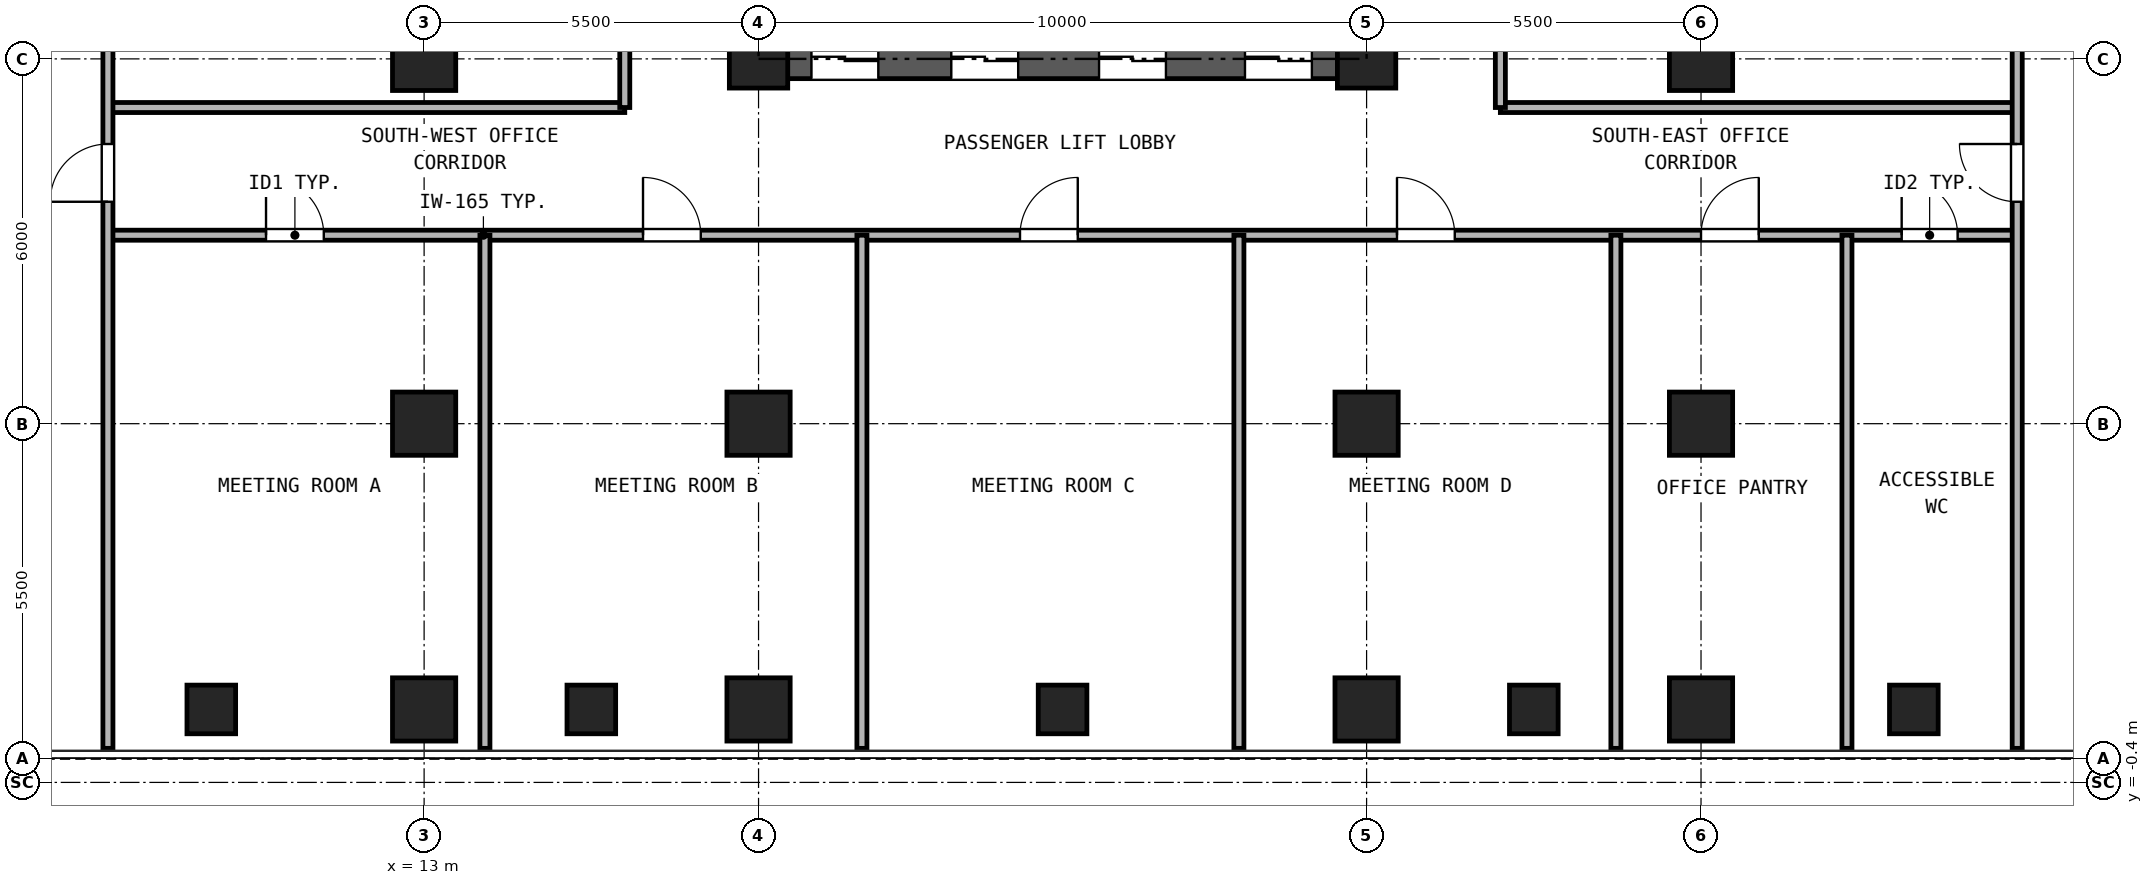
"""IFC4 building model, lengths in metres.
Left out: names, types, materials, properties, quantities, classifications, styles, units other than length and angle.
Written with IfcOpenShell. Run it as: python <this file> out.ifc"""

import sys

from ifc_helpers import new_model, si_unit, direction, frame, frame_2d, origin, origin_2d, place, context, subcontext, project, spatial, rectangle, hollow_rectangle, extrude, source, transform, mapped, element, fill, save


model = new_model("IFC4")
c1 = context("Model", 3, precision=1e-05, world=origin(), true_north=direction((0.0, 1.0)))
c2 = subcontext(c1, "Body", "Model", "MODEL_VIEW")
j1 = project(units=[si_unit("LENGTHUNIT", "METRE"), si_unit("PLANEANGLEUNIT", "RADIAN")], contexts=[c1])
p1 = place(None, origin())
s1 = spatial("IfcSite", under=j1, at=p1, CompositionType="ELEMENT")
p2 = place(p1, origin())
s2 = spatial("IfcBuilding", under=s1, at=p2, CompositionType="ELEMENT")
p3 = place(p2, frame((0.0, 0.0, 65.7)))
s3 = spatial("IfcBuildingStorey", under=s2, at=p3, CompositionType="ELEMENT", Elevation=65.7)
m1 = source(origin(), c2, "Body", "SweptSolid", [
    extrude(hollow_rectangle(XDim=1.04, YDim=1.04, WallThickness=0.065, at=origin_2d()), origin(), (0.0, 0.0, 1.0), 3.32),
])
for number, where, z_axis, x_axis in (
    (1, (13.0, 0.8, 0.0), (0.0, 0.0, 1.0), (1.0, 0.0, 0.0)),
    (2, (18.5, 0.8, 0.0), (0.0, 0.0, 1.0), (1.0, 0.0, 0.0)),
    (3, (28.5, 0.8, 0.0), (0.0, 0.0, 1.0), (1.0, 0.0, 0.0)),
    (4, (34.0, 0.8, 0.0), (0.0, 0.0, 1.0), (1.0, 0.0, 0.0)),
    (5, (13.0, 5.5, 0.0), (0.0, 0.0, 1.0), (1.0, 0.0, 0.0)),
    (6, (13.0, 11.5, 0.0), (0.0, 0.0, 1.0), (1.0, 0.0, 0.0)),
    (7, (18.5, 5.5, 0.0), (0.0, 0.0, 1.0), (1.0, 0.0, 0.0)),
):
    element("IfcColumn", number, at=place(p3, frame(where, z_axis=z_axis, x_axis=x_axis)), inside=s3, PredefinedType="COLUMN", context=c2, shape_type="MappedRepresentation", body=[
        mapped(m1, transform((0.0, 0.0, 0.0), x_axis=(1.0, 0.0, 0.0), y_axis=(0.0, 1.0, 0.0), z_axis=(0.0, 0.0, 1.0), scale=1.0)),
    ])
m2 = source(origin(), c2, "Body", "SweptSolid", [
    extrude(hollow_rectangle(XDim=0.96, YDim=0.96, WallThickness=0.06, at=origin_2d()), origin(), (0.0, 0.0, 1.0), 3.32),
])
p4 = place(p3, frame((18.5, 11.5, 0.0), z_axis=(0.0, 0.0, 1.0), x_axis=(1.0, 0.0, 0.0)))
e8 = element("IfcColumn", 8, at=p4, inside=s3, PredefinedType="COLUMN", context=c2, shape_type="MappedRepresentation", body=[
    mapped(m2, transform((0.0, 0.0, 0.0), x_axis=(1.0, 0.0, 0.0), y_axis=(0.0, 1.0, 0.0), z_axis=(0.0, 0.0, 1.0), scale=1.0)),
])
p5 = place(p3, frame((28.5, 5.5, 0.0), z_axis=(0.0, 0.0, 1.0), x_axis=(1.0, 0.0, 0.0)))
e9 = element("IfcColumn", 9, at=p5, inside=s3, PredefinedType="COLUMN", context=c2, shape_type="MappedRepresentation", body=[
    mapped(m1, transform((0.0, 0.0, 0.0), x_axis=(1.0, 0.0, 0.0), y_axis=(0.0, 1.0, 0.0), z_axis=(0.0, 0.0, 1.0), scale=1.0)),
])
p6 = place(p3, frame((28.5, 11.5, 0.0), z_axis=(0.0, 0.0, 1.0), x_axis=(1.0, 0.0, 0.0)))
e10 = element("IfcColumn", 10, at=p6, inside=s3, PredefinedType="COLUMN", context=c2, shape_type="MappedRepresentation", body=[
    mapped(m2, transform((0.0, 0.0, 0.0), x_axis=(1.0, 0.0, 0.0), y_axis=(0.0, 1.0, 0.0), z_axis=(0.0, 0.0, 1.0), scale=1.0)),
])
for number, where, z_axis, x_axis in (
    (11, (34.0, 5.5, 0.0), (0.0, 0.0, 1.0), (1.0, 0.0, 0.0)),
    (12, (34.0, 11.5, 0.0), (0.0, 0.0, 1.0), (1.0, 0.0, 0.0)),
):
    element("IfcColumn", number, at=place(p3, frame(where, z_axis=z_axis, x_axis=x_axis)), inside=s3, PredefinedType="COLUMN", context=c2, shape_type="MappedRepresentation", body=[
        mapped(m1, transform((0.0, 0.0, 0.0), x_axis=(1.0, 0.0, 0.0), y_axis=(0.0, 1.0, 0.0), z_axis=(0.0, 0.0, 1.0), scale=1.0)),
    ])
m3 = source(origin(), c2, "Body", "SweptSolid", [
    extrude(hollow_rectangle(XDim=0.8, YDim=0.8, WallThickness=0.045, at=origin_2d()), origin(), (0.0, 0.0, 1.0), 3.32),
])
for number, where, z_axis, x_axis in (
    (13, (9.5, 0.8, 0.0), (0.0, 0.0, 1.0), (1.0, 0.0, 0.0)),
    (14, (15.75, 0.8, 0.0), (0.0, 0.0, 1.0), (1.0, 0.0, 0.0)),
    (15, (23.5, 0.8, 0.0), (0.0, 0.0, 1.0), (1.0, 0.0, 0.0)),
    (16, (31.25, 0.8, 0.0), (0.0, 0.0, 1.0), (1.0, 0.0, 0.0)),
    (17, (37.5, 0.8, 0.0), (0.0, 0.0, 1.0), (1.0, 0.0, 0.0)),
):
    element("IfcColumn", number, at=place(p3, frame(where, z_axis=z_axis, x_axis=x_axis)), inside=s3, PredefinedType="COLUMN", context=c2, shape_type="MappedRepresentation", body=[
        mapped(m3, transform((0.0, 0.0, 0.0), x_axis=(1.0, 0.0, 0.0), y_axis=(0.0, 1.0, 0.0), z_axis=(0.0, 0.0, 1.0), scale=1.0)),
    ])
p7 = place(p3, frame((18.175, 11.5, 0.0), z_axis=(0.0, 0.0, 1.0), x_axis=(1.0, 0.0, 0.0)))
e18 = element("IfcWall", 18, at=p7, inside=s3, PredefinedType="SHEAR", context=c2, shape_type="SweptSolid", body=[
    extrude(rectangle(XDim=10.65, YDim=0.65, at=frame_2d((5.325, 0.0))), origin(), (0.0, 0.0, 1.0), 3.32),
])
p8 = place(p7, frame((1.195, 0.0, 0.0)))
e19 = element("IfcOpeningElement", 19, at=p8, cuts=e18, PredefinedType="OPENING", context=c2, shape_type="SweptSolid", body=[
    extrude(rectangle(XDim=1.1, YDim=2.25, at=frame_2d((0.55, 1.125))), frame((0.0, 0.335, 0.0), z_axis=(0.0, -1.0, 0.0), x_axis=(1.0, 0.0, 0.0)), (0.0, 0.0, 1.0), 0.67),
])
p9 = place(p7, frame((3.495, 0.0, 0.0)))
e20 = element("IfcOpeningElement", 20, at=p9, cuts=e18, PredefinedType="OPENING", context=c2, shape_type="SweptSolid", body=[
    extrude(rectangle(XDim=1.1, YDim=2.25, at=frame_2d((0.55, 1.125))), frame((0.0, 0.335, 0.0), z_axis=(0.0, -1.0, 0.0), x_axis=(1.0, 0.0, 0.0)), (0.0, 0.0, 1.0), 0.67),
])
p10 = place(p7, frame((5.925, 0.0, 0.0)))
e21 = element("IfcOpeningElement", 21, at=p10, cuts=e18, PredefinedType="OPENING", context=c2, shape_type="SweptSolid", body=[
    extrude(rectangle(XDim=1.1, YDim=2.25, at=frame_2d((0.55, 1.125))), frame((0.0, 0.335, 0.0), z_axis=(0.0, -1.0, 0.0), x_axis=(1.0, 0.0, 0.0)), (0.0, 0.0, 1.0), 0.67),
])
p11 = place(p7, frame((8.325, 0.0, 0.0)))
e22 = element("IfcOpeningElement", 22, at=p11, cuts=e18, PredefinedType="OPENING", context=c2, shape_type="SweptSolid", body=[
    extrude(rectangle(XDim=1.1, YDim=2.25, at=frame_2d((0.55, 1.125))), frame((0.0, 0.335, 0.0), z_axis=(0.0, -1.0, 0.0), x_axis=(1.0, 0.0, 0.0)), (0.0, 0.0, 1.0), 0.67),
])
p12 = place(p3, frame((7.8, 8.6, 0.0), z_axis=(0.0, 0.0, 1.0), x_axis=(1.0, 0.0, 0.0)))
e23 = element("IfcWall", 23, at=p12, inside=s3, PredefinedType="PARTITIONING", context=c2, shape_type="SweptSolid", body=[
    extrude(rectangle(XDim=31.4, YDim=0.165, at=frame_2d((15.7, 0.0))), origin(), (0.0, 0.0, 1.0), 2.898),
])
p13 = place(p12, frame((2.6, 0.0, 0.0)))
e24 = element("IfcOpeningElement", 24, at=p13, cuts=e23, PredefinedType="OPENING", context=c2, shape_type="SweptSolid", body=[
    extrude(rectangle(XDim=0.95, YDim=2.15, at=frame_2d((0.475, 1.075))), frame((0.0, 0.093, 0.0), z_axis=(0.0, -1.0, 0.0), x_axis=(1.0, 0.0, 0.0)), (0.0, 0.0, 1.0), 0.185),
])
p14 = place(p12, frame((8.8, 0.0, 0.0)))
e25 = element("IfcOpeningElement", 25, at=p14, cuts=e23, PredefinedType="OPENING", context=c2, shape_type="SweptSolid", body=[
    extrude(rectangle(XDim=0.95, YDim=2.15, at=frame_2d((0.475, 1.075))), frame((0.0, 0.093, 0.0), z_axis=(0.0, -1.0, 0.0), x_axis=(1.0, 0.0, 0.0)), (0.0, 0.0, 1.0), 0.185),
])
p15 = place(p12, frame((15.0, 0.0, 0.0)))
e26 = element("IfcOpeningElement", 26, at=p15, cuts=e23, PredefinedType="OPENING", context=c2, shape_type="SweptSolid", body=[
    extrude(rectangle(XDim=0.95, YDim=2.15, at=frame_2d((0.475, 1.075))), frame((0.0, 0.093, 0.0), z_axis=(0.0, -1.0, 0.0), x_axis=(1.0, 0.0, 0.0)), (0.0, 0.0, 1.0), 0.185),
])
p16 = place(p12, frame((21.2, 0.0, 0.0)))
e27 = element("IfcOpeningElement", 27, at=p16, cuts=e23, PredefinedType="OPENING", context=c2, shape_type="SweptSolid", body=[
    extrude(rectangle(XDim=0.95, YDim=2.15, at=frame_2d((0.475, 1.075))), frame((0.0, 0.093, 0.0), z_axis=(0.0, -1.0, 0.0), x_axis=(1.0, 0.0, 0.0)), (0.0, 0.0, 1.0), 0.185),
])
p17 = place(p12, frame((26.2, 0.0, 0.0)))
e28 = element("IfcOpeningElement", 28, at=p17, cuts=e23, PredefinedType="OPENING", context=c2, shape_type="SweptSolid", body=[
    extrude(rectangle(XDim=0.95, YDim=2.15, at=frame_2d((0.475, 1.075))), frame((0.0, 0.093, 0.0), z_axis=(0.0, -1.0, 0.0), x_axis=(1.0, 0.0, 0.0)), (0.0, 0.0, 1.0), 0.185),
])
p18 = place(p12, frame((29.5, 0.0, 0.0)))
e29 = element("IfcOpeningElement", 29, at=p18, cuts=e23, PredefinedType="OPENING", context=c2, shape_type="SweptSolid", body=[
    extrude(rectangle(XDim=0.92, YDim=2.1, at=frame_2d((0.46, 1.05))), frame((0.0, 0.093, 0.0), z_axis=(0.0, -1.0, 0.0), x_axis=(1.0, 0.0, 0.0)), (0.0, 0.0, 1.0), 0.185),
])
for number, where, z_axis, x_axis in (
    (30, (7.8, 10.7, 0.0), (0.0, 0.0, 1.0), (1.0, 0.0, 0.0)),
    (31, (30.7, 10.7, 0.0), (0.0, 0.0, 1.0), (1.0, 0.0, 0.0)),
):
    element("IfcWall", number, at=place(p3, frame(where, z_axis=z_axis, x_axis=x_axis)), inside=s3, PredefinedType="PARTITIONING", context=c2, shape_type="SweptSolid", body=[
        extrude(rectangle(XDim=8.5, YDim=0.165, at=frame_2d((4.25, 0.0))), origin(), (0.0, 0.0, 1.0), 3.32),
    ])
p19 = place(p3, frame((16.3, 10.7, 0.0), z_axis=(0.0, 0.0, 1.0), x_axis=(0.0, 1.0, 0.0)))
e32 = element("IfcWall", 32, at=p19, inside=s3, PredefinedType="PARTITIONING", context=c2, shape_type="SweptSolid", body=[
    extrude(rectangle(XDim=18.9, YDim=0.165, at=frame_2d((9.45, 0.0))), origin(), (0.0, 0.0, 1.0), 3.32),
])
p20 = place(p19, frame((5.611, 0.0, 0.0)))
e33 = element("IfcOpeningElement", 33, at=p20, cuts=e32, PredefinedType="OPENING", context=c2, shape_type="SweptSolid", body=[
    extrude(rectangle(XDim=0.95, YDim=2.15, at=frame_2d((0.475, 1.075))), frame((0.0, 0.093, 0.0), z_axis=(0.0, -1.0, 0.0), x_axis=(1.0, 0.0, 0.0)), (0.0, 0.0, 1.0), 0.185),
])
p21 = place(p19, frame((15.061, 0.0, 0.0)))
e34 = element("IfcOpeningElement", 34, at=p21, cuts=e32, PredefinedType="OPENING", context=c2, shape_type="SweptSolid", body=[
    extrude(rectangle(XDim=0.95, YDim=2.15, at=frame_2d((0.475, 1.075))), frame((0.0, 0.093, 0.0), z_axis=(0.0, -1.0, 0.0), x_axis=(1.0, 0.0, 0.0)), (0.0, 0.0, 1.0), 0.185),
])
p22 = place(p3, frame((30.7, 10.7, 0.0), z_axis=(0.0, 0.0, 1.0), x_axis=(0.0, 1.0, 0.0)))
e35 = element("IfcWall", 35, at=p22, inside=s3, PredefinedType="PARTITIONING", context=c2, shape_type="SweptSolid", body=[
    extrude(rectangle(XDim=18.9, YDim=0.165, at=frame_2d((9.45, 0.0))), origin(), (0.0, 0.0, 1.0), 3.32),
])
p23 = place(p22, frame((8.95, 0.0, 0.0)))
e36 = element("IfcOpeningElement", 36, at=p23, cuts=e35, PredefinedType="OPENING", context=c2, shape_type="SweptSolid", body=[
    extrude(rectangle(XDim=0.95, YDim=2.15, at=frame_2d((0.475, 1.075))), frame((0.0, 0.093, 0.0), z_axis=(0.0, -1.0, 0.0), x_axis=(1.0, 0.0, 0.0)), (0.0, 0.0, 1.0), 0.185),
])
p24 = place(p3, frame((7.8, 0.16, 0.0), z_axis=(0.0, 0.0, 1.0), x_axis=(0.0, 1.0, 0.0)))
e37 = element("IfcWall", 37, at=p24, inside=s3, PredefinedType="PARTITIONING", context=c2, shape_type="SweptSolid", body=[
    extrude(rectangle(XDim=40.18, YDim=0.165, at=frame_2d((20.09, 0.0))), origin(), (0.0, 0.0, 1.0), 3.32),
])
p25 = place(p24, frame((8.99, 0.0, 0.0)))
e38 = element("IfcOpeningElement", 38, at=p25, cuts=e37, PredefinedType="OPENING", context=c2, shape_type="SweptSolid", body=[
    extrude(rectangle(XDim=0.95, YDim=2.15, at=frame_2d((0.475, 1.075))), frame((0.0, 0.093, 0.0), z_axis=(0.0, -1.0, 0.0), x_axis=(1.0, 0.0, 0.0)), (0.0, 0.0, 1.0), 0.185),
])
p26 = place(p24, frame((29.99, 0.0, 0.0)))
e39 = element("IfcOpeningElement", 39, at=p26, cuts=e37, PredefinedType="OPENING", context=c2, shape_type="SweptSolid", body=[
    extrude(rectangle(XDim=0.95, YDim=2.15, at=frame_2d((0.475, 1.075))), frame((0.0, 0.093, 0.0), z_axis=(0.0, -1.0, 0.0), x_axis=(1.0, 0.0, 0.0)), (0.0, 0.0, 1.0), 0.185),
])
p27 = place(p3, frame((39.2, 0.16, 0.0), z_axis=(0.0, 0.0, 1.0), x_axis=(0.0, 1.0, 0.0)))
e40 = element("IfcWall", 40, at=p27, inside=s3, PredefinedType="PARTITIONING", context=c2, shape_type="SweptSolid", body=[
    extrude(rectangle(XDim=40.18, YDim=0.165, at=frame_2d((20.09, 0.0))), origin(), (0.0, 0.0, 1.0), 3.32),
])
p28 = place(p27, frame((8.99, 0.0, 0.0)))
e41 = element("IfcOpeningElement", 41, at=p28, cuts=e40, PredefinedType="OPENING", context=c2, shape_type="SweptSolid", body=[
    extrude(rectangle(XDim=0.95, YDim=2.15, at=frame_2d((0.475, 1.075))), frame((0.0, 0.093, 0.0), z_axis=(0.0, -1.0, 0.0), x_axis=(1.0, 0.0, 0.0)), (0.0, 0.0, 1.0), 0.185),
])
p29 = place(p27, frame((29.99, 0.0, 0.0)))
e42 = element("IfcOpeningElement", 42, at=p29, cuts=e40, PredefinedType="OPENING", context=c2, shape_type="SweptSolid", body=[
    extrude(rectangle(XDim=0.95, YDim=2.15, at=frame_2d((0.475, 1.075))), frame((0.0, 0.093, 0.0), z_axis=(0.0, -1.0, 0.0), x_axis=(1.0, 0.0, 0.0)), (0.0, 0.0, 1.0), 0.185),
])
for number, where, z_axis, x_axis in (
    (43, (14.0, 0.16, 0.0), (0.0, 0.0, 1.0), (0.0, 1.0, 0.0)),
    (44, (20.2, 0.16, 0.0), (0.0, 0.0, 1.0), (0.0, 1.0, 0.0)),
    (45, (26.4, 0.16, 0.0), (0.0, 0.0, 1.0), (0.0, 1.0, 0.0)),
    (46, (32.6, 0.16, 0.0), (0.0, 0.0, 1.0), (0.0, 1.0, 0.0)),
    (47, (36.4, 0.16, 0.0), (0.0, 0.0, 1.0), (0.0, 1.0, 0.0)),
):
    element("IfcWall", number, at=place(p3, frame(where, z_axis=z_axis, x_axis=x_axis)), inside=s3, PredefinedType="PARTITIONING", context=c2, shape_type="SweptSolid", body=[
        extrude(rectangle(XDim=8.44, YDim=0.165, at=frame_2d((4.22, 0.0))), origin(), (0.0, 0.0, 1.0), 3.32),
    ])
p30 = place(p8, frame((1.1, 0.0, 0.0), z_axis=(0.0, 0.0, 1.0), x_axis=(-1.0, 0.0, 0.0)))
e48 = element("IfcDoor", 48, at=p30, inside=s3, OperationType="DOUBLE_DOOR_SLIDING", PredefinedType="DOOR", context=c2, shape_type="SweptSolid", body=[
    extrude(rectangle(XDim=1.1, YDim=2.25, at=frame_2d((0.55, 1.125))), frame((0.0, 0.025, 0.0), z_axis=(0.0, -1.0, 0.0), x_axis=(1.0, 0.0, 0.0)), (0.0, 0.0, 1.0), 0.05),
])
fill(e19, e48)
p31 = place(p9, frame((1.1, 0.0, 0.0), z_axis=(0.0, 0.0, 1.0), x_axis=(-1.0, 0.0, 0.0)))
e49 = element("IfcDoor", 49, at=p31, inside=s3, OperationType="DOUBLE_DOOR_SLIDING", PredefinedType="DOOR", context=c2, shape_type="SweptSolid", body=[
    extrude(rectangle(XDim=1.1, YDim=2.25, at=frame_2d((0.55, 1.125))), frame((0.0, 0.025, 0.0), z_axis=(0.0, -1.0, 0.0), x_axis=(1.0, 0.0, 0.0)), (0.0, 0.0, 1.0), 0.05),
])
fill(e20, e49)
p32 = place(p10, frame((1.1, 0.0, 0.0), z_axis=(0.0, 0.0, 1.0), x_axis=(-1.0, 0.0, 0.0)))
e50 = element("IfcDoor", 50, at=p32, inside=s3, OperationType="DOUBLE_DOOR_SLIDING", PredefinedType="DOOR", context=c2, shape_type="SweptSolid", body=[
    extrude(rectangle(XDim=1.1, YDim=2.25, at=frame_2d((0.55, 1.125))), frame((0.0, 0.025, 0.0), z_axis=(0.0, -1.0, 0.0), x_axis=(1.0, 0.0, 0.0)), (0.0, 0.0, 1.0), 0.05),
])
fill(e21, e50)
p33 = place(p11, frame((1.1, 0.0, 0.0), z_axis=(0.0, 0.0, 1.0), x_axis=(-1.0, 0.0, 0.0)))
e51 = element("IfcDoor", 51, at=p33, inside=s3, OperationType="DOUBLE_DOOR_SLIDING", PredefinedType="DOOR", context=c2, shape_type="SweptSolid", body=[
    extrude(rectangle(XDim=1.1, YDim=2.25, at=frame_2d((0.55, 1.125))), frame((0.0, 0.025, 0.0), z_axis=(0.0, -1.0, 0.0), x_axis=(1.0, 0.0, 0.0)), (0.0, 0.0, 1.0), 0.05),
])
fill(e22, e51)
p34 = place(p13, frame((0.95, 0.0, 0.0), z_axis=(0.0, 0.0, 1.0), x_axis=(-1.0, 0.0, 0.0)))
e52 = element("IfcDoor", 52, at=p34, inside=s3, OperationType="SINGLE_SWING_LEFT", PredefinedType="DOOR", context=c2, shape_type="SweptSolid", body=[
    extrude(rectangle(XDim=0.95, YDim=2.15, at=frame_2d((0.475, 1.075))), frame((0.0, 0.025, 0.0), z_axis=(0.0, -1.0, 0.0), x_axis=(1.0, 0.0, 0.0)), (0.0, 0.0, 1.0), 0.05),
])
fill(e24, e52)
p35 = place(p14, frame((0.95, 0.0, 0.0), z_axis=(0.0, 0.0, 1.0), x_axis=(-1.0, 0.0, 0.0)))
e53 = element("IfcDoor", 53, at=p35, inside=s3, OperationType="SINGLE_SWING_LEFT", PredefinedType="DOOR", context=c2, shape_type="SweptSolid", body=[
    extrude(rectangle(XDim=0.95, YDim=2.15, at=frame_2d((0.475, 1.075))), frame((0.0, 0.025, 0.0), z_axis=(0.0, -1.0, 0.0), x_axis=(1.0, 0.0, 0.0)), (0.0, 0.0, 1.0), 0.05),
])
fill(e25, e53)
p36 = place(p15, frame((0.95, 0.0, 0.0), z_axis=(0.0, 0.0, 1.0), x_axis=(-1.0, 0.0, 0.0)))
e54 = element("IfcDoor", 54, at=p36, inside=s3, OperationType="SINGLE_SWING_RIGHT", PredefinedType="DOOR", context=c2, shape_type="SweptSolid", body=[
    extrude(rectangle(XDim=0.95, YDim=2.15, at=frame_2d((0.475, 1.075))), frame((0.0, 0.025, 0.0), z_axis=(0.0, -1.0, 0.0), x_axis=(1.0, 0.0, 0.0)), (0.0, 0.0, 1.0), 0.05),
])
fill(e26, e54)
p37 = place(p16, frame((0.95, 0.0, 0.0), z_axis=(0.0, 0.0, 1.0), x_axis=(-1.0, 0.0, 0.0)))
e55 = element("IfcDoor", 55, at=p37, inside=s3, OperationType="SINGLE_SWING_LEFT", PredefinedType="DOOR", context=c2, shape_type="SweptSolid", body=[
    extrude(rectangle(XDim=0.95, YDim=2.15, at=frame_2d((0.475, 1.075))), frame((0.0, 0.025, 0.0), z_axis=(0.0, -1.0, 0.0), x_axis=(1.0, 0.0, 0.0)), (0.0, 0.0, 1.0), 0.05),
])
fill(e27, e55)
p38 = place(p17, frame((0.95, 0.0, 0.0), z_axis=(0.0, 0.0, 1.0), x_axis=(-1.0, 0.0, 0.0)))
e56 = element("IfcDoor", 56, at=p38, inside=s3, OperationType="SINGLE_SWING_RIGHT", PredefinedType="DOOR", context=c2, shape_type="SweptSolid", body=[
    extrude(rectangle(XDim=0.95, YDim=2.15, at=frame_2d((0.475, 1.075))), frame((0.0, 0.025, 0.0), z_axis=(0.0, -1.0, 0.0), x_axis=(1.0, 0.0, 0.0)), (0.0, 0.0, 1.0), 0.05),
])
fill(e28, e56)
p39 = place(p18, frame((0.92, 0.0, 0.0), z_axis=(0.0, 0.0, 1.0), x_axis=(-1.0, 0.0, 0.0)))
e57 = element("IfcDoor", 57, at=p39, inside=s3, OperationType="SINGLE_SWING_LEFT", PredefinedType="DOOR", context=c2, shape_type="SweptSolid", body=[
    extrude(rectangle(XDim=0.92, YDim=2.1, at=frame_2d((0.46, 1.05))), frame((0.0, 0.025, 0.0), z_axis=(0.0, -1.0, 0.0), x_axis=(1.0, 0.0, 0.0)), (0.0, 0.0, 1.0), 0.05),
])
fill(e29, e57)
p40 = place(p25, frame((0.95, 0.0, 0.0), z_axis=(0.0, 0.0, 1.0), x_axis=(-1.0, 0.0, 0.0)))
e58 = element("IfcDoor", 58, at=p40, inside=s3, OperationType="SINGLE_SWING_LEFT", PredefinedType="DOOR", context=c2, shape_type="SweptSolid", body=[
    extrude(rectangle(XDim=0.95, YDim=2.15, at=frame_2d((0.475, 1.075))), frame((0.0, 0.025, 0.0), z_axis=(0.0, -1.0, 0.0), x_axis=(1.0, 0.0, 0.0)), (0.0, 0.0, 1.0), 0.05),
])
fill(e38, e58)
p41 = place(p28, origin())
e59 = element("IfcDoor", 59, at=p41, inside=s3, OperationType="SINGLE_SWING_RIGHT", PredefinedType="DOOR", context=c2, shape_type="SweptSolid", body=[
    extrude(rectangle(XDim=0.95, YDim=2.15, at=frame_2d((0.475, 1.075))), frame((0.0, 0.025, 0.0), z_axis=(0.0, -1.0, 0.0), x_axis=(1.0, 0.0, 0.0)), (0.0, 0.0, 1.0), 0.05),
])
fill(e41, e59)
save(model, sys.argv[1])
